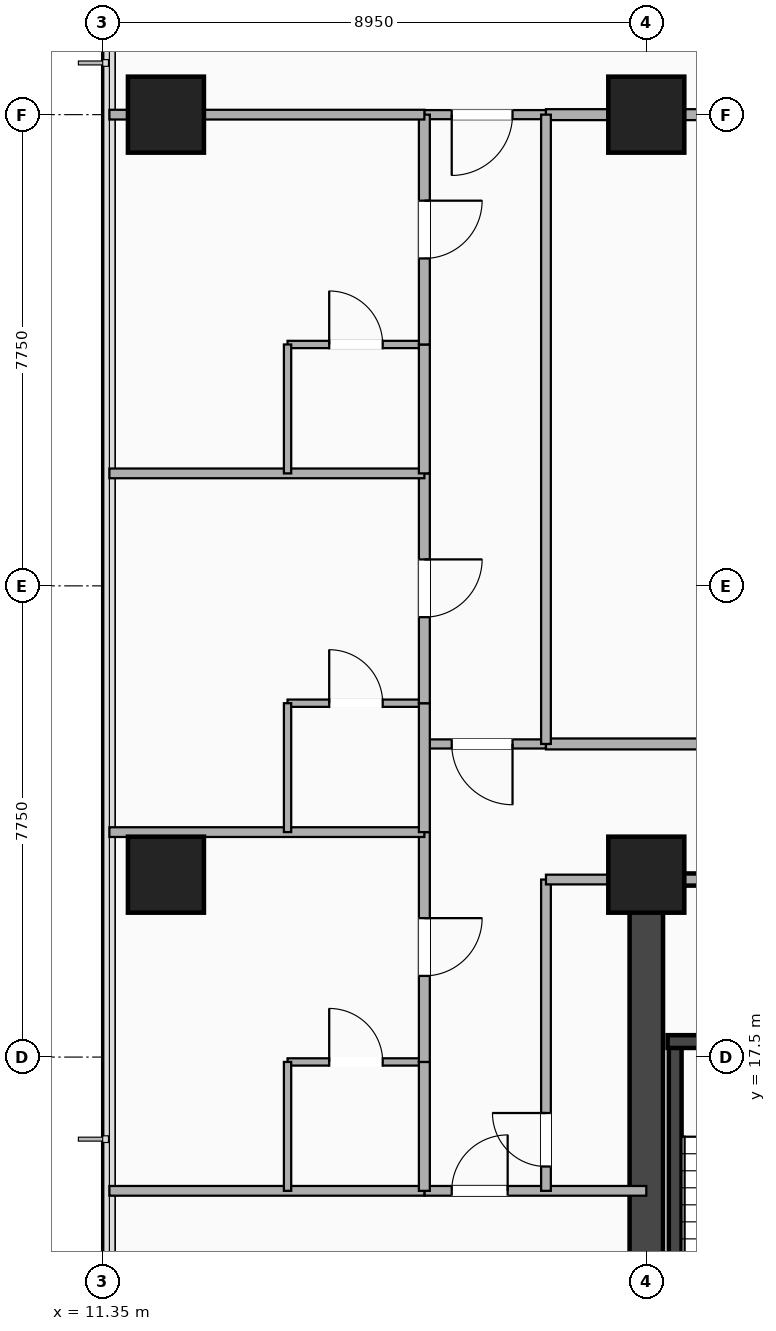
"""IFC4 building model, lengths in metres.
Left out: names, types, materials, properties, quantities, classifications, styles, units other than length and angle.
Written with IfcOpenShell. Run it as: python <this file> out.ifc"""

import sys

from ifc_helpers import new_model, si_unit, direction, frame, frame_2d, origin, origin_2d, place, context, subcontext, project, spatial, rectangle, extrude, element, fill, save


model = new_model("IFC4")
c1 = context("Model", 3, precision=1e-05, world=origin(), true_north=direction((0.0, 1.0)))
c2 = subcontext(c1, "Body", "Model", "MODEL_VIEW")
j1 = project(units=[si_unit("LENGTHUNIT", "METRE"), si_unit("PLANEANGLEUNIT", "RADIAN")], contexts=[c1])
p1 = place(None, origin())
s1 = spatial("IfcSite", under=j1, at=p1, CompositionType="ELEMENT")
p2 = place(p1, origin())
s2 = spatial("IfcBuilding", under=s1, at=p2, CompositionType="ELEMENT")
p3 = place(p2, frame((0.0, 0.0, 91.7)))
s3 = spatial("IfcBuildingStorey", under=s2, at=p3, CompositionType="ELEMENT", Elevation=91.7)
p4 = place(p3, frame((20.3, 3.5, 0.0), z_axis=(0.0, 0.0, 1.0), x_axis=(0.0, 1.0, 0.0)))
e1 = element("IfcWall", 1, at=p4, inside=s3, PredefinedType="SHEAR", context=c2, shape_type="SweptSolid", body=[
    extrude(rectangle(XDim=16.9, YDim=0.55, at=frame_2d((8.45, 0.0))), origin(), (0.0, 0.0, 1.0), 3.24),
])
p5 = place(p3, frame((20.775, 9.745, 0.0), z_axis=(0.0, 0.0, 1.0), x_axis=(0.0, 1.0, 0.0)))
e2 = element("IfcWall", 2, at=p5, inside=s3, PredefinedType="SHEAR", context=c2, shape_type="SweptSolid", body=[
    extrude(rectangle(XDim=8.01, YDim=0.21, at=frame_2d((4.005, 0.0))), origin(), (0.0, 0.0, 1.0), 3.24),
])
p6 = place(p3, frame((20.65, 17.755, 0.0), z_axis=(0.0, 0.0, 1.0), x_axis=(1.0, 0.0, 0.0)))
e3 = element("IfcWall", 3, at=p6, inside=s3, PredefinedType="SHEAR", context=c2, shape_type="SweptSolid", body=[
    extrude(rectangle(XDim=8.3, YDim=0.21, at=frame_2d((4.15, 0.0))), origin(), (0.0, 0.0, 1.0), 3.24),
])
p7 = place(p6, frame((2.2, 0.0, 0.0), z_axis=(0.0, 0.0, 1.0), x_axis=(-1.0, 0.0, 0.0)))
e4 = element("IfcOpeningElement", 4, at=p7, cuts=e3, PredefinedType="OPENING", context=c2, shape_type="SweptSolid", body=[
    extrude(rectangle(XDim=1.05, YDim=2.15, at=frame_2d((0.525, 1.075))), frame((0.0, 0.115, 0.0), z_axis=(0.0, -1.0, 0.0), x_axis=(1.0, 0.0, 0.0)), (0.0, 0.0, 1.0), 0.23),
])
p8 = place(p6, frame((4.15, 0.0, 0.0)))
e5 = element("IfcOpeningElement", 5, at=p8, cuts=e3, PredefinedType="OPENING", context=c2, shape_type="SweptSolid", body=[
    extrude(rectangle(XDim=1.1, YDim=2.18, at=frame_2d((0.55, 1.09))), frame((0.0, 0.115, 0.0), z_axis=(0.0, -1.0, 0.0), x_axis=(1.0, 0.0, 0.0)), (0.0, 0.0, 1.0), 0.23),
])
p9 = place(p6, frame((6.45, 0.0, 0.0)))
e6 = element("IfcOpeningElement", 6, at=p9, cuts=e3, PredefinedType="OPENING", context=c2, shape_type="SweptSolid", body=[
    extrude(rectangle(XDim=1.12, YDim=2.2, at=frame_2d((0.56, 1.1))), frame((0.0, 0.115, 0.0), z_axis=(0.0, -1.0, 0.0), x_axis=(1.0, 0.0, 0.0)), (0.0, 0.0, 1.0), 0.23),
])
for number, where, z_axis, x_axis in (
    (7, (20.3, 20.5, -0.26), (0.0, 0.0, 1.0), (1.0, 0.0, 0.0)),
    (8, (20.3, 33.0, -0.26), (0.0, 0.0, 1.0), (1.0, 0.0, 0.0)),
    (9, (12.4, 20.5, -0.26), (0.0, 0.0, 1.0), (1.0, 0.0, 0.0)),
    (10, (12.4, 33.0, -0.26), (0.0, 0.0, 1.0), (1.0, 0.0, 0.0)),
):
    element("IfcColumn", number, at=place(p3, frame(where, z_axis=z_axis, x_axis=x_axis)), inside=s3, PredefinedType="COLUMN", context=c2, shape_type="SweptSolid", body=[
        extrude(rectangle(XDim=1.25, YDim=1.25, at=origin_2d()), origin(), (0.0, 0.0, 1.0), 3.5),
    ])
p10 = place(p3, frame((20.65, 20.42, 0.0), z_axis=(0.0, 0.0, 1.0), x_axis=(1.0, 0.0, 0.0)))
e11 = element("IfcWall", 11, at=p10, inside=s3, PredefinedType="PARTITIONING", context=c2, shape_type="SweptSolid", body=[
    extrude(rectangle(XDim=5.73, YDim=0.2, at=frame_2d((2.865, 0.0))), origin(), (0.0, 0.0, 1.0), 2.313),
])
p11 = place(p10, frame((2.3, 0.0, 0.0)))
e12 = element("IfcOpeningElement", 12, at=p11, cuts=e11, PredefinedType="OPENING", context=c2, shape_type="SweptSolid", body=[
    extrude(rectangle(XDim=1.1, YDim=2.15, at=frame_2d((0.55, 1.075))), frame((0.0, 0.11, 0.0), z_axis=(0.0, -1.0, 0.0), x_axis=(1.0, 0.0, 0.0)), (0.0, 0.0, 1.0), 0.22),
])
p12 = place(p3, frame((16.65, 15.3, 0.0), z_axis=(0.0, 0.0, 1.0), x_axis=(1.0, 0.0, 0.0)))
e13 = element("IfcWall", 13, at=p12, inside=s3, PredefinedType="PARTITIONING", context=c2, shape_type="SweptSolid", body=[
    extrude(rectangle(XDim=3.65, YDim=0.16, at=frame_2d((1.825, 0.0))), origin(), (0.0, 0.0, 1.0), 2.313),
])
p13 = place(p12, frame((1.37, 0.0, 0.0), z_axis=(0.0, 0.0, 1.0), x_axis=(-1.0, 0.0, 0.0)))
e14 = element("IfcOpeningElement", 14, at=p13, cuts=e13, PredefinedType="OPENING", context=c2, shape_type="SweptSolid", body=[
    extrude(rectangle(XDim=0.92, YDim=2.08, at=frame_2d((0.46, 1.04))), frame((0.0, 0.09, 0.0), z_axis=(0.0, -1.0, 0.0), x_axis=(1.0, 0.0, 0.0)), (0.0, 0.0, 1.0), 0.18),
])
p14 = place(p3, frame((18.65, 15.3, 0.0), z_axis=(0.0, 0.0, 1.0), x_axis=(0.0, 1.0, 0.0)))
e15 = element("IfcWall", 15, at=p14, inside=s3, PredefinedType="PARTITIONING", context=c2, shape_type="SweptSolid", body=[
    extrude(rectangle(XDim=5.12, YDim=0.16, at=frame_2d((2.56, 0.0))), origin(), (0.0, 0.0, 1.0), 2.313),
])
p15 = place(p14, frame((1.28, 0.0, 0.0), z_axis=(0.0, 0.0, 1.0), x_axis=(-1.0, 0.0, 0.0)))
e16 = element("IfcOpeningElement", 16, at=p15, cuts=e15, PredefinedType="OPENING", context=c2, shape_type="SweptSolid", body=[
    extrude(rectangle(XDim=0.88, YDim=2.08, at=frame_2d((0.44, 1.04))), frame((0.0, 0.09, 0.0), z_axis=(0.0, -1.0, 0.0), x_axis=(1.0, 0.0, 0.0)), (0.0, 0.0, 1.0), 0.18),
])
p16 = place(p3, frame((18.65, 20.42, 0.0), z_axis=(0.0, 0.0, 1.0), x_axis=(1.0, 0.0, 0.0)))
e17 = element("IfcWall", 17, at=p16, inside=s3, PredefinedType="PARTITIONING", context=c2, shape_type="SweptSolid", body=[
    extrude(rectangle(XDim=1.65, YDim=0.16, at=frame_2d((0.825, 0.0))), origin(), (0.0, 0.0, 1.0), 2.313),
])
p17 = place(p3, frame((16.65, 22.65, 0.0), z_axis=(0.0, 0.0, 1.0), x_axis=(1.0, 0.0, 0.0)))
e18 = element("IfcWall", 18, at=p17, inside=s3, PredefinedType="PARTITIONING", context=c2, shape_type="SweptSolid", body=[
    extrude(rectangle(XDim=2.0, YDim=0.15, at=frame_2d((1.0, 0.0))), origin(), (0.0, 0.0, 1.0), 3.24),
])
p18 = place(p17, frame((0.45, 0.0, 0.0)))
e19 = element("IfcOpeningElement", 19, at=p18, cuts=e18, PredefinedType="OPENING", context=c2, shape_type="SweptSolid", body=[
    extrude(rectangle(XDim=1.0, YDim=2.15, at=frame_2d((0.5, 1.075))), frame((0.0, 0.085, 0.0), z_axis=(0.0, -1.0, 0.0), x_axis=(1.0, 0.0, 0.0)), (0.0, 0.0, 1.0), 0.17),
])
p19 = place(p3, frame((16.65, 33.0, 0.0), z_axis=(0.0, 0.0, 1.0), x_axis=(1.0, 0.0, 0.0)))
e20 = element("IfcWall", 20, at=p19, inside=s3, PredefinedType="PARTITIONING", context=c2, shape_type="SweptSolid", body=[
    extrude(rectangle(XDim=2.0, YDim=0.15, at=frame_2d((1.0, 0.0))), origin(), (0.0, 0.0, 1.0), 2.313),
])
p20 = place(p19, frame((0.45, 0.0, 0.0)))
e21 = element("IfcOpeningElement", 21, at=p20, cuts=e20, PredefinedType="OPENING", context=c2, shape_type="SweptSolid", body=[
    extrude(rectangle(XDim=1.0, YDim=2.15, at=frame_2d((0.5, 1.075))), frame((0.0, 0.085, 0.0), z_axis=(0.0, -1.0, 0.0), x_axis=(1.0, 0.0, 0.0)), (0.0, 0.0, 1.0), 0.17),
])
p21 = place(p3, frame((18.65, 22.65, 0.0), z_axis=(0.0, 0.0, 1.0), x_axis=(1.0, 0.0, 0.0)))
e22 = element("IfcWall", 22, at=p21, inside=s3, PredefinedType="PARTITIONING", context=c2, shape_type="SweptSolid", body=[
    extrude(rectangle(XDim=10.55, YDim=0.18, at=frame_2d((5.275, 0.0))), origin(), (0.0, 0.0, 1.0), 2.313),
])
p22 = place(p21, frame((4.8, 0.0, 0.0)))
e23 = element("IfcOpeningElement", 23, at=p22, cuts=e22, PredefinedType="OPENING", context=c2, shape_type="SweptSolid", body=[
    extrude(rectangle(XDim=0.95, YDim=2.15, at=frame_2d((0.475, 1.075))), frame((0.0, 0.1, 0.0), z_axis=(0.0, -1.0, 0.0), x_axis=(1.0, 0.0, 0.0)), (0.0, 0.0, 1.0), 0.2),
])
p23 = place(p3, frame((18.65, 33.0, 0.0), z_axis=(0.0, 0.0, 1.0), x_axis=(1.0, 0.0, 0.0)))
e24 = element("IfcWall", 24, at=p23, inside=s3, PredefinedType="PARTITIONING", context=c2, shape_type="SweptSolid", body=[
    extrude(rectangle(XDim=10.55, YDim=0.18, at=frame_2d((5.275, 0.0))), origin(), (0.0, 0.0, 1.0), 2.313),
])
p24 = place(p3, frame((18.65, 22.65, 0.0), z_axis=(0.0, 0.0, 1.0), x_axis=(0.0, 1.0, 0.0)))
e25 = element("IfcWall", 25, at=p24, inside=s3, PredefinedType="PARTITIONING", context=c2, shape_type="SweptSolid", body=[
    extrude(rectangle(XDim=10.35, YDim=0.16, at=frame_2d((5.175, 0.0))), origin(), (0.0, 0.0, 1.0), 2.313),
])
p25 = place(p3, frame((11.47, 15.3, 0.0), z_axis=(0.0, 0.0, 1.0), x_axis=(1.0, 0.0, 0.0)))
e26 = element("IfcWall", 26, at=p25, inside=s3, PredefinedType="PARTITIONING", context=c2, shape_type="SweptSolid", body=[
    extrude(rectangle(XDim=5.18, YDim=0.16, at=frame_2d((2.59, 0.0))), origin(), (0.0, 0.0, 1.0), 2.603),
])
p26 = place(p3, frame((14.4, 17.42, 0.0), z_axis=(0.0, 0.0, 1.0), x_axis=(1.0, 0.0, 0.0)))
e27 = element("IfcWall", 27, at=p26, inside=s3, PredefinedType="PARTITIONING", context=c2, shape_type="SweptSolid", body=[
    extrude(rectangle(XDim=2.25, YDim=0.12, at=frame_2d((1.125, 0.0))), origin(), (0.0, 0.0, 1.0), 3.24),
])
p27 = place(p26, frame((1.565, 0.0, 0.0), z_axis=(0.0, 0.0, 1.0), x_axis=(-1.0, 0.0, 0.0)))
e28 = element("IfcOpeningElement", 28, at=p27, cuts=e27, PredefinedType="OPENING", context=c2, shape_type="SweptSolid", body=[
    extrude(rectangle(XDim=0.88, YDim=2.08, at=frame_2d((0.44, 1.04))), frame((0.0, 0.07, 0.0), z_axis=(0.0, -1.0, 0.0), x_axis=(1.0, 0.0, 0.0)), (0.0, 0.0, 1.0), 0.14),
])
p28 = place(p3, frame((14.4, 15.3, 0.0), z_axis=(0.0, 0.0, 1.0), x_axis=(0.0, 1.0, 0.0)))
e29 = element("IfcWall", 29, at=p28, inside=s3, PredefinedType="PARTITIONING", context=c2, shape_type="SweptSolid", body=[
    extrude(rectangle(XDim=2.12, YDim=0.12, at=frame_2d((1.06, 0.0))), origin(), (0.0, 0.0, 1.0), 2.922),
])
p29 = place(p3, frame((16.65, 15.3, 0.0), z_axis=(0.0, 0.0, 1.0), x_axis=(0.0, 1.0, 0.0)))
e30 = element("IfcWall", 30, at=p29, inside=s3, PredefinedType="PARTITIONING", context=c2, shape_type="SweptSolid", body=[
    extrude(rectangle(XDim=2.12, YDim=0.18, at=frame_2d((1.06, 0.0))), origin(), (0.0, 0.0, 1.0), 2.922),
])
p30 = place(p3, frame((16.65, 17.42, 0.0), z_axis=(0.0, 0.0, 1.0), x_axis=(0.0, 1.0, 0.0)))
e31 = element("IfcWall", 31, at=p30, inside=s3, PredefinedType="PARTITIONING", context=c2, shape_type="SweptSolid", body=[
    extrude(rectangle(XDim=3.78, YDim=0.18, at=frame_2d((1.89, 0.0))), origin(), (0.0, 0.0, 1.0), 2.313),
])
p31 = place(p30, frame((1.415, 0.0, 0.0)))
e32 = element("IfcOpeningElement", 32, at=p31, cuts=e31, PredefinedType="OPENING", context=c2, shape_type="SweptSolid", body=[
    extrude(rectangle(XDim=0.95, YDim=2.15, at=frame_2d((0.475, 1.075))), frame((0.0, 0.1, 0.0), z_axis=(0.0, -1.0, 0.0), x_axis=(1.0, 0.0, 0.0)), (0.0, 0.0, 1.0), 0.2),
])
p32 = place(p3, frame((11.47, 21.2, 0.0), z_axis=(0.0, 0.0, 1.0), x_axis=(1.0, 0.0, 0.0)))
e33 = element("IfcWall", 33, at=p32, inside=s3, PredefinedType="PARTITIONING", context=c2, shape_type="SweptSolid", body=[
    extrude(rectangle(XDim=5.18, YDim=0.16, at=frame_2d((2.59, 0.0))), origin(), (0.0, 0.0, 1.0), 2.603),
])
p33 = place(p3, frame((14.4, 23.32, 0.0), z_axis=(0.0, 0.0, 1.0), x_axis=(1.0, 0.0, 0.0)))
e34 = element("IfcWall", 34, at=p33, inside=s3, PredefinedType="PARTITIONING", context=c2, shape_type="SweptSolid", body=[
    extrude(rectangle(XDim=2.25, YDim=0.12, at=frame_2d((1.125, 0.0))), origin(), (0.0, 0.0, 1.0), 3.24),
])
p34 = place(p33, frame((1.565, 0.0, 0.0), z_axis=(0.0, 0.0, 1.0), x_axis=(-1.0, 0.0, 0.0)))
e35 = element("IfcOpeningElement", 35, at=p34, cuts=e34, PredefinedType="OPENING", context=c2, shape_type="SweptSolid", body=[
    extrude(rectangle(XDim=0.88, YDim=2.08, at=frame_2d((0.44, 1.04))), frame((0.0, 0.07, 0.0), z_axis=(0.0, -1.0, 0.0), x_axis=(1.0, 0.0, 0.0)), (0.0, 0.0, 1.0), 0.14),
])
p35 = place(p3, frame((14.4, 21.2, 0.0), z_axis=(0.0, 0.0, 1.0), x_axis=(0.0, 1.0, 0.0)))
e36 = element("IfcWall", 36, at=p35, inside=s3, PredefinedType="PARTITIONING", context=c2, shape_type="SweptSolid", body=[
    extrude(rectangle(XDim=2.12, YDim=0.12, at=frame_2d((1.06, 0.0))), origin(), (0.0, 0.0, 1.0), 3.24),
])
p36 = place(p3, frame((16.65, 21.2, 0.0), z_axis=(0.0, 0.0, 1.0), x_axis=(0.0, 1.0, 0.0)))
e37 = element("IfcWall", 37, at=p36, inside=s3, PredefinedType="PARTITIONING", context=c2, shape_type="SweptSolid", body=[
    extrude(rectangle(XDim=2.12, YDim=0.18, at=frame_2d((1.06, 0.0))), origin(), (0.0, 0.0, 1.0), 3.24),
])
p37 = place(p3, frame((16.65, 23.32, 0.0), z_axis=(0.0, 0.0, 1.0), x_axis=(0.0, 1.0, 0.0)))
e38 = element("IfcWall", 38, at=p37, inside=s3, PredefinedType="PARTITIONING", context=c2, shape_type="SweptSolid", body=[
    extrude(rectangle(XDim=3.78, YDim=0.18, at=frame_2d((1.89, 0.0))), origin(), (0.0, 0.0, 1.0), 2.818),
])
p38 = place(p37, frame((1.415, 0.0, 0.0)))
e39 = element("IfcOpeningElement", 39, at=p38, cuts=e38, PredefinedType="OPENING", context=c2, shape_type="SweptSolid", body=[
    extrude(rectangle(XDim=0.95, YDim=2.15, at=frame_2d((0.475, 1.075))), frame((0.0, 0.1, 0.0), z_axis=(0.0, -1.0, 0.0), x_axis=(1.0, 0.0, 0.0)), (0.0, 0.0, 1.0), 0.2),
])
p39 = place(p3, frame((11.47, 27.1, 0.0), z_axis=(0.0, 0.0, 1.0), x_axis=(1.0, 0.0, 0.0)))
e40 = element("IfcWall", 40, at=p39, inside=s3, PredefinedType="PARTITIONING", context=c2, shape_type="SweptSolid", body=[
    extrude(rectangle(XDim=5.18, YDim=0.16, at=frame_2d((2.59, 0.0))), origin(), (0.0, 0.0, 1.0), 2.603),
])
p40 = place(p3, frame((14.4, 29.22, 0.0), z_axis=(0.0, 0.0, 1.0), x_axis=(1.0, 0.0, 0.0)))
e41 = element("IfcWall", 41, at=p40, inside=s3, PredefinedType="PARTITIONING", context=c2, shape_type="SweptSolid", body=[
    extrude(rectangle(XDim=2.25, YDim=0.12, at=frame_2d((1.125, 0.0))), origin(), (0.0, 0.0, 1.0), 3.24),
])
p41 = place(p40, frame((1.565, 0.0, 0.0), z_axis=(0.0, 0.0, 1.0), x_axis=(-1.0, 0.0, 0.0)))
e42 = element("IfcOpeningElement", 42, at=p41, cuts=e41, PredefinedType="OPENING", context=c2, shape_type="SweptSolid", body=[
    extrude(rectangle(XDim=0.88, YDim=2.08, at=frame_2d((0.44, 1.04))), frame((0.0, 0.07, 0.0), z_axis=(0.0, -1.0, 0.0), x_axis=(1.0, 0.0, 0.0)), (0.0, 0.0, 1.0), 0.14),
])
p42 = place(p3, frame((14.4, 27.1, 0.0), z_axis=(0.0, 0.0, 1.0), x_axis=(0.0, 1.0, 0.0)))
e43 = element("IfcWall", 43, at=p42, inside=s3, PredefinedType="PARTITIONING", context=c2, shape_type="SweptSolid", body=[
    extrude(rectangle(XDim=2.12, YDim=0.12, at=frame_2d((1.06, 0.0))), origin(), (0.0, 0.0, 1.0), 2.818),
])
p43 = place(p3, frame((16.65, 27.1, 0.0), z_axis=(0.0, 0.0, 1.0), x_axis=(0.0, 1.0, 0.0)))
e44 = element("IfcWall", 44, at=p43, inside=s3, PredefinedType="PARTITIONING", context=c2, shape_type="SweptSolid", body=[
    extrude(rectangle(XDim=2.12, YDim=0.18, at=frame_2d((1.06, 0.0))), origin(), (0.0, 0.0, 1.0), 2.818),
])
p44 = place(p3, frame((16.65, 29.22, 0.0), z_axis=(0.0, 0.0, 1.0), x_axis=(0.0, 1.0, 0.0)))
e45 = element("IfcWall", 45, at=p44, inside=s3, PredefinedType="PARTITIONING", context=c2, shape_type="SweptSolid", body=[
    extrude(rectangle(XDim=3.78, YDim=0.18, at=frame_2d((1.89, 0.0))), origin(), (0.0, 0.0, 1.0), 2.313),
])
p45 = place(p44, frame((1.415, 0.0, 0.0)))
e46 = element("IfcOpeningElement", 46, at=p45, cuts=e45, PredefinedType="OPENING", context=c2, shape_type="SweptSolid", body=[
    extrude(rectangle(XDim=0.95, YDim=2.15, at=frame_2d((0.475, 1.075))), frame((0.0, 0.1, 0.0), z_axis=(0.0, -1.0, 0.0), x_axis=(1.0, 0.0, 0.0)), (0.0, 0.0, 1.0), 0.2),
])
p46 = place(p3, frame((11.47, 33.0, 0.0), z_axis=(0.0, 0.0, 1.0), x_axis=(1.0, 0.0, 0.0)))
e47 = element("IfcWall", 47, at=p46, inside=s3, PredefinedType="PARTITIONING", context=c2, shape_type="SweptSolid", body=[
    extrude(rectangle(XDim=5.18, YDim=0.16, at=frame_2d((2.59, 0.0))), origin(), (0.0, 0.0, 1.0), 2.313),
])
p47 = place(p13, origin())
e48 = element("IfcDoor", 48, at=p47, inside=s3, OperationType="SINGLE_SWING_RIGHT", PredefinedType="DOOR", context=c2, shape_type="SweptSolid", body=[
    extrude(rectangle(XDim=0.92, YDim=2.08, at=frame_2d((0.46, 1.04))), frame((0.0, 0.025, 0.0), z_axis=(0.0, -1.0, 0.0), x_axis=(1.0, 0.0, 0.0)), (0.0, 0.0, 1.0), 0.05),
])
fill(e14, e48)
p48 = place(p15, origin())
e49 = element("IfcDoor", 49, at=p48, inside=s3, OperationType="SINGLE_SWING_RIGHT", PredefinedType="DOOR", context=c2, shape_type="SweptSolid", body=[
    extrude(rectangle(XDim=0.88, YDim=2.08, at=frame_2d((0.44, 1.04))), frame((0.0, 0.025, 0.0), z_axis=(0.0, -1.0, 0.0), x_axis=(1.0, 0.0, 0.0)), (0.0, 0.0, 1.0), 0.05),
])
fill(e16, e49)
p49 = place(p18, origin())
e50 = element("IfcDoor", 50, at=p49, inside=s3, OperationType="SINGLE_SWING_RIGHT", PredefinedType="DOOR", context=c2, shape_type="SweptSolid", body=[
    extrude(rectangle(XDim=1.0, YDim=2.15, at=frame_2d((0.5, 1.075))), frame((0.0, 0.025, 0.0), z_axis=(0.0, -1.0, 0.0), x_axis=(1.0, 0.0, 0.0)), (0.0, 0.0, 1.0), 0.05),
])
fill(e19, e50)
p50 = place(p20, origin())
e51 = element("IfcDoor", 51, at=p50, inside=s3, OperationType="SINGLE_SWING_LEFT", PredefinedType="DOOR", context=c2, shape_type="SweptSolid", body=[
    extrude(rectangle(XDim=1.0, YDim=2.15, at=frame_2d((0.5, 1.075))), frame((0.0, 0.025, 0.0), z_axis=(0.0, -1.0, 0.0), x_axis=(1.0, 0.0, 0.0)), (0.0, 0.0, 1.0), 0.05),
])
fill(e21, e51)
p51 = place(p27, origin())
e52 = element("IfcDoor", 52, at=p51, inside=s3, OperationType="SINGLE_SWING_LEFT", PredefinedType="DOOR", context=c2, shape_type="SweptSolid", body=[
    extrude(rectangle(XDim=0.88, YDim=2.08, at=frame_2d((0.44, 1.04))), frame((0.0, 0.025, 0.0), z_axis=(0.0, -1.0, 0.0), x_axis=(1.0, 0.0, 0.0)), (0.0, 0.0, 1.0), 0.05),
])
fill(e28, e52)
p52 = place(p31, origin())
e53 = element("IfcDoor", 53, at=p52, inside=s3, OperationType="SINGLE_SWING_RIGHT", PredefinedType="DOOR", context=c2, shape_type="SweptSolid", body=[
    extrude(rectangle(XDim=0.95, YDim=2.15, at=frame_2d((0.475, 1.075))), frame((0.0, 0.025, 0.0), z_axis=(0.0, -1.0, 0.0), x_axis=(1.0, 0.0, 0.0)), (0.0, 0.0, 1.0), 0.05),
])
fill(e32, e53)
p53 = place(p34, origin())
e54 = element("IfcDoor", 54, at=p53, inside=s3, OperationType="SINGLE_SWING_LEFT", PredefinedType="DOOR", context=c2, shape_type="SweptSolid", body=[
    extrude(rectangle(XDim=0.88, YDim=2.08, at=frame_2d((0.44, 1.04))), frame((0.0, 0.025, 0.0), z_axis=(0.0, -1.0, 0.0), x_axis=(1.0, 0.0, 0.0)), (0.0, 0.0, 1.0), 0.05),
])
fill(e35, e54)
p54 = place(p38, origin())
e55 = element("IfcDoor", 55, at=p54, inside=s3, OperationType="SINGLE_SWING_RIGHT", PredefinedType="DOOR", context=c2, shape_type="SweptSolid", body=[
    extrude(rectangle(XDim=0.95, YDim=2.15, at=frame_2d((0.475, 1.075))), frame((0.0, 0.025, 0.0), z_axis=(0.0, -1.0, 0.0), x_axis=(1.0, 0.0, 0.0)), (0.0, 0.0, 1.0), 0.05),
])
fill(e39, e55)
p55 = place(p41, origin())
e56 = element("IfcDoor", 56, at=p55, inside=s3, OperationType="SINGLE_SWING_LEFT", PredefinedType="DOOR", context=c2, shape_type="SweptSolid", body=[
    extrude(rectangle(XDim=0.88, YDim=2.08, at=frame_2d((0.44, 1.04))), frame((0.0, 0.025, 0.0), z_axis=(0.0, -1.0, 0.0), x_axis=(1.0, 0.0, 0.0)), (0.0, 0.0, 1.0), 0.05),
])
fill(e42, e56)
p56 = place(p45, origin())
e57 = element("IfcDoor", 57, at=p56, inside=s3, OperationType="SINGLE_SWING_RIGHT", PredefinedType="DOOR", context=c2, shape_type="SweptSolid", body=[
    extrude(rectangle(XDim=0.95, YDim=2.15, at=frame_2d((0.475, 1.075))), frame((0.0, 0.025, 0.0), z_axis=(0.0, -1.0, 0.0), x_axis=(1.0, 0.0, 0.0)), (0.0, 0.0, 1.0), 0.05),
])
fill(e46, e57)
save(model, sys.argv[1])
